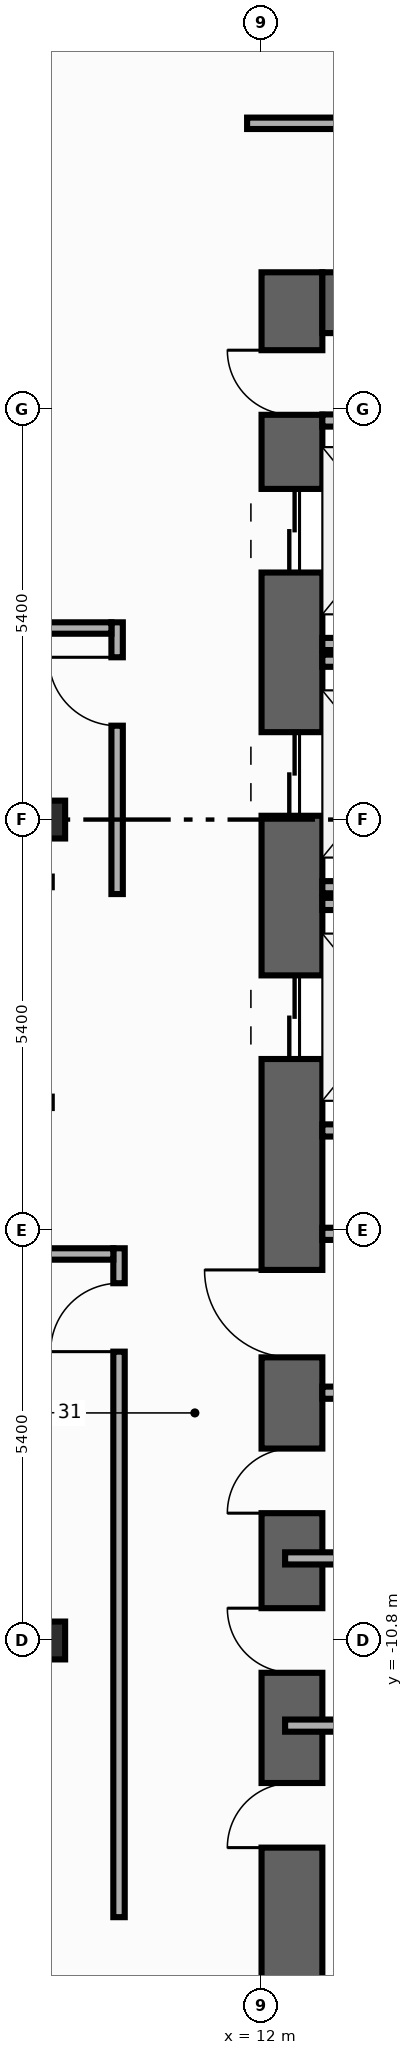
"""IFC4 building model, lengths in metres.
Left out: names, types, materials, properties, quantities, classifications, styles, units other than length and angle.
Written with IfcOpenShell. Run it as: python <this file> out.ifc"""

import sys

from ifc_helpers import new_model, si_unit, direction, frame, frame_2d, origin, origin_2d, place, context, subcontext, project, spatial, rectangle, i_section, extrude, element, fill, save


model = new_model("IFC4")
c1 = context("Model", 3, precision=1e-05, world=origin(), true_north=direction((0.0, 1.0)))
c2 = subcontext(c1, "Body", "Model", "MODEL_VIEW")
j1 = project(units=[si_unit("LENGTHUNIT", "METRE"), si_unit("PLANEANGLEUNIT", "RADIAN")], contexts=[c1])
p1 = place(None, origin())
s1 = spatial("IfcSite", under=j1, at=p1, CompositionType="ELEMENT")
p2 = place(p1, origin())
s2 = spatial("IfcBuilding", under=s1, at=p2, CompositionType="ELEMENT")
p3 = place(p2, frame((0.0, 0.0, 131.0)))
s3 = spatial("IfcBuildingStorey", under=s2, at=p3, CompositionType="ELEMENT", Elevation=131.0)
p4 = place(p3, frame((12.4, -19.8, 0.0), z_axis=(0.0, 0.0, 1.0), x_axis=(0.0, 1.0, 0.0)))
e1 = element("IfcWall", 1, at=p4, inside=s3, PredefinedType="SHEAR", context=c2, shape_type="SweptSolid", body=[
    extrude(rectangle(XDim=27.0, YDim=0.8, at=frame_2d((13.5, 0.0))), origin(), (0.0, 0.0, 1.0), 3.94),
])
p5 = place(p4, frame((23.05, 0.0, 0.0)))
e2 = element("IfcOpeningElement", 2, at=p5, cuts=e1, PredefinedType="OPENING", context=c2, shape_type="SweptSolid", body=[
    extrude(rectangle(XDim=1.1, YDim=2.2, at=frame_2d((0.55, 1.1))), frame((0.0, 0.41, 0.0), z_axis=(0.0, -1.0, 0.0), x_axis=(1.0, 0.0, 0.0)), (0.0, 0.0, 1.0), 0.82),
])
p6 = place(p4, frame((19.85, 0.0, 0.0)))
e3 = element("IfcOpeningElement", 3, at=p6, cuts=e1, PredefinedType="OPENING", context=c2, shape_type="SweptSolid", body=[
    extrude(rectangle(XDim=1.1, YDim=2.2, at=frame_2d((0.55, 1.1))), frame((0.0, 0.41, 0.0), z_axis=(0.0, -1.0, 0.0), x_axis=(1.0, 0.0, 0.0)), (0.0, 0.0, 1.0), 0.82),
])
p7 = place(p4, frame((16.65, 0.0, 0.0)))
e4 = element("IfcOpeningElement", 4, at=p7, cuts=e1, PredefinedType="OPENING", context=c2, shape_type="SweptSolid", body=[
    extrude(rectangle(XDim=1.1, YDim=2.2, at=frame_2d((0.55, 1.1))), frame((0.0, 0.41, 0.0), z_axis=(0.0, -1.0, 0.0), x_axis=(1.0, 0.0, 0.0)), (0.0, 0.0, 1.0), 0.82),
])
p8 = place(p4, frame((6.275, 0.0, 0.0)))
e5 = element("IfcOpeningElement", 5, at=p8, cuts=e1, PredefinedType="OPENING", context=c2, shape_type="SweptSolid", body=[
    extrude(rectangle(XDim=0.85, YDim=2.1, at=frame_2d((0.425, 1.05))), frame((0.0, 0.41, 0.0), z_axis=(0.0, -1.0, 0.0), x_axis=(1.0, 0.0, 0.0)), (0.0, 0.0, 1.0), 0.82),
])
p9 = place(p4, frame((8.575, 0.0, 0.0)))
e6 = element("IfcOpeningElement", 6, at=p9, cuts=e1, PredefinedType="OPENING", context=c2, shape_type="SweptSolid", body=[
    extrude(rectangle(XDim=0.85, YDim=2.1, at=frame_2d((0.425, 1.05))), frame((0.0, 0.41, 0.0), z_axis=(0.0, -1.0, 0.0), x_axis=(1.0, 0.0, 0.0)), (0.0, 0.0, 1.0), 0.82),
])
p10 = place(p4, frame((10.675, 0.0, 0.0)))
e7 = element("IfcOpeningElement", 7, at=p10, cuts=e1, PredefinedType="OPENING", context=c2, shape_type="SweptSolid", body=[
    extrude(rectangle(XDim=0.85, YDim=2.1, at=frame_2d((0.425, 1.05))), frame((0.0, 0.41, 0.0), z_axis=(0.0, -1.0, 0.0), x_axis=(1.0, 0.0, 0.0)), (0.0, 0.0, 1.0), 0.82),
])
p11 = place(p4, frame((12.725, 0.0, 0.0)))
e8 = element("IfcOpeningElement", 8, at=p11, cuts=e1, PredefinedType="OPENING", context=c2, shape_type="SweptSolid", body=[
    extrude(rectangle(XDim=1.15, YDim=2.2, at=frame_2d((0.575, 1.1))), frame((0.0, 0.41, 0.0), z_axis=(0.0, -1.0, 0.0), x_axis=(1.0, 0.0, 0.0)), (0.0, 0.0, 1.0), 0.82),
])
p12 = place(p4, frame((25.125, 0.0, 0.0)))
e9 = element("IfcOpeningElement", 9, at=p12, cuts=e1, PredefinedType="OPENING", context=c2, shape_type="SweptSolid", body=[
    extrude(rectangle(XDim=0.85, YDim=2.1, at=frame_2d((0.425, 1.05))), frame((0.0, 0.41, 0.0), z_axis=(0.0, -1.0, 0.0), x_axis=(1.0, 0.0, 0.0)), (0.0, 0.0, 1.0), 0.82),
])
p13 = place(p3, frame((12.8, 6.8, 0.0), z_axis=(0.0, 0.0, 1.0), x_axis=(1.0, 0.0, 0.0)))
e10 = element("IfcWall", 10, at=p13, inside=s3, PredefinedType="SHEAR", context=c2, shape_type="SweptSolid", body=[
    extrude(rectangle(XDim=6.8, YDim=0.8, at=frame_2d((3.4, 0.0))), origin(), (0.0, 0.0, 1.0), 3.94),
])
for number, where, z_axis, x_axis in (
    (11, (9.2, -10.8, 0.0), (0.0, 0.0, 1.0), (1.0, 0.0, 0.0)),
    (12, (9.2, 0.0, 0.0), (0.0, 0.0, 1.0), (1.0, 0.0, 0.0)),
):
    element("IfcColumn", number, at=place(p3, frame(where, z_axis=z_axis, x_axis=x_axis)), inside=s3, PredefinedType="COLUMN", context=c2, shape_type="SweptSolid", body=[
        extrude(i_section(OverallWidth=0.432, OverallDepth=0.498, WebThickness=0.045, FlangeThickness=0.07, FilletRadius=0.022, at=origin_2d()), origin(), (0.0, 0.0, 1.0), 4.2),
    ])
for number, where, z_axis, x_axis in (
    (13, (12.8, 2.31, 0.0), (0.0, 0.0, 1.0), (1.0, 0.0, 0.0)),
    (14, (12.8, -0.89, 0.0), (0.0, 0.0, 1.0), (1.0, 0.0, 0.0)),
    (15, (12.8, 2.09, 0.0), (0.0, 0.0, 1.0), (1.0, 0.0, 0.0)),
    (16, (12.8, -4.09, 0.0), (0.0, 0.0, 1.0), (1.0, 0.0, 0.0)),
    (17, (12.8, -1.11, 0.0), (0.0, 0.0, 1.0), (1.0, 0.0, 0.0)),
):
    element("IfcWall", number, at=place(p3, frame(where, z_axis=z_axis, x_axis=x_axis)), inside=s3, PredefinedType="STANDARD", context=c2, shape_type="SweptSolid", body=[
        extrude(rectangle(XDim=2.19, YDim=0.16, at=frame_2d((1.095, 0.0))), origin(), (0.0, 0.0, 1.0), 3.94),
    ])
for number, where, z_axis, x_axis in (
    (18, (12.8, -5.45, 0.0), (0.0, 0.0, 1.0), (1.0, 0.0, 0.0)),
    (19, (12.8, -7.54, 0.0), (0.0, 0.0, 1.0), (1.0, 0.0, 0.0)),
    (20, (12.8, 5.25, 0.0), (0.0, 0.0, 1.0), (1.0, 0.0, 0.0)),
):
    element("IfcWall", number, at=place(p3, frame(where, z_axis=z_axis, x_axis=x_axis)), inside=s3, PredefinedType="STANDARD", context=c2, shape_type="SweptSolid", body=[
        extrude(rectangle(XDim=2.6, YDim=0.16, at=frame_2d((1.3, 0.0))), origin(), (0.0, 0.0, 1.0), 3.94),
    ])
for number, where, z_axis, x_axis in (
    (21, (12.31, -11.92, 0.0), (0.0, 0.0, 1.0), (1.0, 0.0, 0.0)),
    (22, (12.31, -9.72, 0.0), (0.0, 0.0, 1.0), (1.0, 0.0, 0.0)),
):
    element("IfcWall", number, at=place(p3, frame(where, z_axis=z_axis, x_axis=x_axis)), inside=s3, PredefinedType="PARTITIONING", context=c2, shape_type="SweptSolid", body=[
        extrude(rectangle(XDim=3.065, YDim=0.16, at=frame_2d((1.532, 0.0))), origin(), (0.0, 0.0, 1.0), 3.94),
    ])
p14 = place(p3, frame((10.1, -0.98, 0.0), z_axis=(0.0, 0.0, 1.0), x_axis=(0.0, 1.0, 0.0)))
e23 = element("IfcWall", 23, at=p14, inside=s3, PredefinedType="PARTITIONING", context=c2, shape_type="SweptSolid", body=[
    extrude(rectangle(XDim=3.575, YDim=0.15, at=frame_2d((1.788, 0.0))), origin(), (0.0, 0.0, 1.0), 3.94),
])
p15 = place(p14, frame((2.215, 0.0, 0.0)))
e24 = element("IfcOpeningElement", 24, at=p15, cuts=e23, PredefinedType="OPENING", context=c2, shape_type="SweptSolid", body=[
    extrude(rectangle(XDim=0.9, YDim=2.15, at=frame_2d((0.45, 1.075))), frame((0.0, 0.085, 0.0), z_axis=(0.0, -1.0, 0.0), x_axis=(1.0, 0.0, 0.0)), (0.0, 0.0, 1.0), 0.17),
])
p16 = place(p3, frame((10.125, -14.44, 0.0), z_axis=(0.0, 0.0, 1.0), x_axis=(0.0, 1.0, 0.0)))
e25 = element("IfcWall", 25, at=p16, inside=s3, PredefinedType="PARTITIONING", context=c2, shape_type="SweptSolid", body=[
    extrude(rectangle(XDim=8.8, YDim=0.15, at=frame_2d((4.4, 0.0))), origin(), (0.0, 0.0, 1.0), 3.94),
])
p17 = place(p16, frame((7.44, 0.0, 0.0)))
e26 = element("IfcOpeningElement", 26, at=p17, cuts=e25, PredefinedType="OPENING", context=c2, shape_type="SweptSolid", body=[
    extrude(rectangle(XDim=0.9, YDim=2.15, at=frame_2d((0.45, 1.075))), frame((0.0, 0.085, 0.0), z_axis=(0.0, -1.0, 0.0), x_axis=(1.0, 0.0, 0.0)), (0.0, 0.0, 1.0), 0.17),
])
p18 = place(p3, frame((6.18, 2.52, 0.0), z_axis=(0.0, 0.0, 1.0), x_axis=(1.0, 0.0, 0.0)))
e27 = element("IfcWall", 27, at=p18, inside=s3, PredefinedType="PARTITIONING", context=c2, shape_type="SweptSolid", body=[
    extrude(rectangle(XDim=3.845, YDim=0.15, at=frame_2d((1.922, 0.0))), origin(), (0.0, 0.0, 1.0), 3.94),
])
p19 = place(p18, frame((0.46, 0.0, 0.0)))
e28 = element("IfcOpeningElement", 28, at=p19, cuts=e27, PredefinedType="OPENING", context=c2, shape_type="SweptSolid", body=[
    extrude(rectangle(XDim=0.9, YDim=2.15, at=frame_2d((0.45, 1.075))), frame((0.0, 0.085, 0.0), z_axis=(0.0, -1.0, 0.0), x_axis=(1.0, 0.0, 0.0)), (0.0, 0.0, 1.0), 0.17),
])
p20 = place(p3, frame((-0.015, -5.715, 0.0), z_axis=(0.0, 0.0, 1.0), x_axis=(1.0, 0.0, 0.0)))
e29 = element("IfcWall", 29, at=p20, inside=s3, PredefinedType="PARTITIONING", context=c2, shape_type="SweptSolid", body=[
    extrude(rectangle(XDim=10.065, YDim=0.15, at=frame_2d((5.032, 0.0))), origin(), (0.0, 0.0, 1.0), 3.94),
])
p21 = place(p20, frame((0.46, 0.0, 0.0)))
e30 = element("IfcOpeningElement", 30, at=p21, cuts=e29, PredefinedType="OPENING", context=c2, shape_type="SweptSolid", body=[
    extrude(rectangle(XDim=0.9, YDim=2.15, at=frame_2d((0.45, 1.075))), frame((0.0, 0.085, 0.0), z_axis=(0.0, -1.0, 0.0), x_axis=(1.0, 0.0, 0.0)), (0.0, 0.0, 1.0), 0.17),
])
p22 = place(p3, frame((11.81, 9.16, 0.0), z_axis=(0.0, 0.0, 1.0), x_axis=(1.0, 0.0, 0.0)))
e31 = element("IfcWall", 31, at=p22, inside=s3, PredefinedType="PARTITIONING", context=c2, shape_type="SweptSolid", body=[
    extrude(rectangle(XDim=8.83, YDim=0.15, at=frame_2d((4.415, 0.0))), origin(), (0.0, 0.0, 1.0), 3.94),
])
p23 = place(p22, frame((5.067, 0.0, 0.0)))
e32 = element("IfcOpeningElement", 32, at=p23, cuts=e31, PredefinedType="OPENING", context=c2, shape_type="SweptSolid", body=[
    extrude(rectangle(XDim=0.9, YDim=2.15, at=frame_2d((0.45, 1.075))), frame((0.0, 0.085, 0.0), z_axis=(0.0, -1.0, 0.0), x_axis=(1.0, 0.0, 0.0)), (0.0, 0.0, 1.0), 0.17),
])
p24 = place(p5, origin())
e33 = element("IfcDoor", 33, at=p24, inside=s3, OperationType="DOUBLE_DOOR_SLIDING", PredefinedType="DOOR", context=c2, shape_type="SweptSolid", body=[
    extrude(rectangle(XDim=1.1, YDim=2.2, at=frame_2d((0.55, 1.1))), frame((0.0, 0.025, 0.0), z_axis=(0.0, -1.0, 0.0), x_axis=(1.0, 0.0, 0.0)), (0.0, 0.0, 1.0), 0.05),
])
fill(e2, e33)
p25 = place(p6, origin())
e34 = element("IfcDoor", 34, at=p25, inside=s3, OperationType="DOUBLE_DOOR_SLIDING", PredefinedType="DOOR", context=c2, shape_type="SweptSolid", body=[
    extrude(rectangle(XDim=1.1, YDim=2.2, at=frame_2d((0.55, 1.1))), frame((0.0, 0.025, 0.0), z_axis=(0.0, -1.0, 0.0), x_axis=(1.0, 0.0, 0.0)), (0.0, 0.0, 1.0), 0.05),
])
fill(e3, e34)
p26 = place(p7, origin())
e35 = element("IfcDoor", 35, at=p26, inside=s3, OperationType="DOUBLE_DOOR_SLIDING", PredefinedType="DOOR", context=c2, shape_type="SweptSolid", body=[
    extrude(rectangle(XDim=1.1, YDim=2.2, at=frame_2d((0.55, 1.1))), frame((0.0, 0.025, 0.0), z_axis=(0.0, -1.0, 0.0), x_axis=(1.0, 0.0, 0.0)), (0.0, 0.0, 1.0), 0.05),
])
fill(e4, e35)
p27 = place(p8, origin())
e36 = element("IfcDoor", 36, at=p27, inside=s3, OperationType="SINGLE_SWING_LEFT", PredefinedType="DOOR", context=c2, shape_type="SweptSolid", body=[
    extrude(rectangle(XDim=0.85, YDim=2.1, at=frame_2d((0.425, 1.05))), frame((0.0, 0.025, 0.0), z_axis=(0.0, -1.0, 0.0), x_axis=(1.0, 0.0, 0.0)), (0.0, 0.0, 1.0), 0.05),
])
fill(e5, e36)
p28 = place(p9, origin())
e37 = element("IfcDoor", 37, at=p28, inside=s3, OperationType="SINGLE_SWING_RIGHT", PredefinedType="DOOR", context=c2, shape_type="SweptSolid", body=[
    extrude(rectangle(XDim=0.85, YDim=2.1, at=frame_2d((0.425, 1.05))), frame((0.0, 0.025, 0.0), z_axis=(0.0, -1.0, 0.0), x_axis=(1.0, 0.0, 0.0)), (0.0, 0.0, 1.0), 0.05),
])
fill(e6, e37)
p29 = place(p10, origin())
e38 = element("IfcDoor", 38, at=p29, inside=s3, OperationType="SINGLE_SWING_LEFT", PredefinedType="DOOR", context=c2, shape_type="SweptSolid", body=[
    extrude(rectangle(XDim=0.85, YDim=2.1, at=frame_2d((0.425, 1.05))), frame((0.0, 0.025, 0.0), z_axis=(0.0, -1.0, 0.0), x_axis=(1.0, 0.0, 0.0)), (0.0, 0.0, 1.0), 0.05),
])
fill(e7, e38)
p30 = place(p11, origin())
e39 = element("IfcDoor", 39, at=p30, inside=s3, OperationType="SINGLE_SWING_RIGHT", PredefinedType="DOOR", context=c2, shape_type="SweptSolid", body=[
    extrude(rectangle(XDim=1.15, YDim=2.2, at=frame_2d((0.575, 1.1))), frame((0.0, 0.025, 0.0), z_axis=(0.0, -1.0, 0.0), x_axis=(1.0, 0.0, 0.0)), (0.0, 0.0, 1.0), 0.05),
])
fill(e8, e39)
p31 = place(p12, origin())
e40 = element("IfcDoor", 40, at=p31, inside=s3, OperationType="SINGLE_SWING_RIGHT", PredefinedType="DOOR", context=c2, shape_type="SweptSolid", body=[
    extrude(rectangle(XDim=0.85, YDim=2.1, at=frame_2d((0.425, 1.05))), frame((0.0, 0.025, 0.0), z_axis=(0.0, -1.0, 0.0), x_axis=(1.0, 0.0, 0.0)), (0.0, 0.0, 1.0), 0.05),
])
fill(e9, e40)
p32 = place(p15, origin())
e41 = element("IfcDoor", 41, at=p32, inside=s3, OperationType="SINGLE_SWING_RIGHT", PredefinedType="DOOR", context=c2, shape_type="SweptSolid", body=[
    extrude(rectangle(XDim=0.9, YDim=2.15, at=frame_2d((0.45, 1.075))), frame((0.0, 0.025, 0.0), z_axis=(0.0, -1.0, 0.0), x_axis=(1.0, 0.0, 0.0)), (0.0, 0.0, 1.0), 0.05),
])
fill(e24, e41)
p33 = place(p17, origin())
e42 = element("IfcDoor", 42, at=p33, inside=s3, OperationType="SINGLE_SWING_LEFT", PredefinedType="DOOR", context=c2, shape_type="SweptSolid", body=[
    extrude(rectangle(XDim=0.9, YDim=2.15, at=frame_2d((0.45, 1.075))), frame((0.0, 0.025, 0.0), z_axis=(0.0, -1.0, 0.0), x_axis=(1.0, 0.0, 0.0)), (0.0, 0.0, 1.0), 0.05),
])
fill(e26, e42)
save(model, sys.argv[1])
